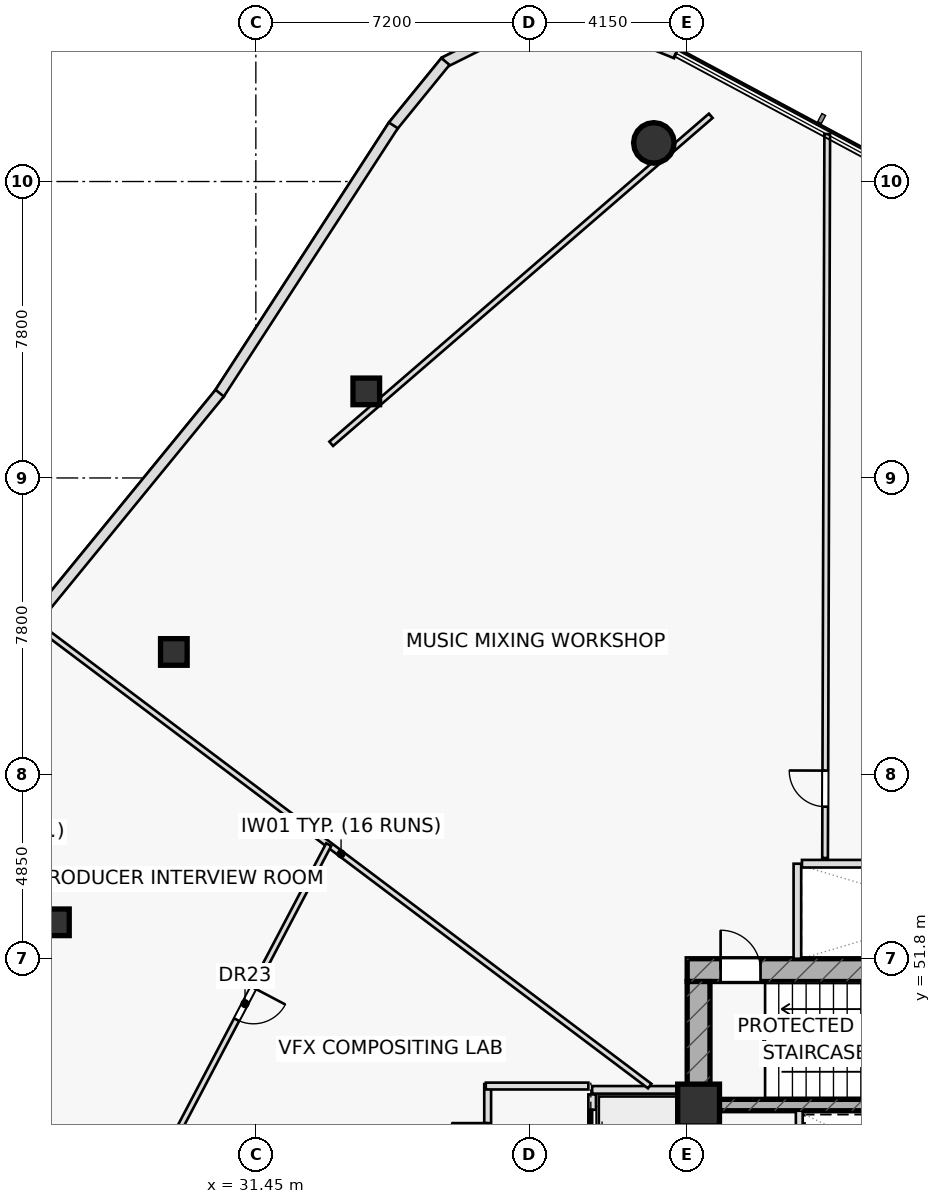
"""IFC4 building model, lengths in metres.
Left out: names, types, materials, properties, quantities, classifications, styles, units other than length and angle.
Written with IfcOpenShell. Run it as: python <this file> out.ifc"""

import sys

from ifc_helpers import new_model, si_unit, direction, frame, frame_2d, origin, origin_2d, place, context, subcontext, project, spatial, rectangle, hollow_rectangle, hollow_circle, extrude, element, fill, save


model = new_model("IFC4")
c1 = context("Model", 3, precision=1e-05, world=origin(), true_north=direction((0.0, 1.0)))
c2 = subcontext(c1, "Body", "Model", "MODEL_VIEW")
j1 = project(units=[si_unit("LENGTHUNIT", "METRE"), si_unit("PLANEANGLEUNIT", "RADIAN")], contexts=[c1])
p1 = place(None, origin())
s1 = spatial("IfcSite", under=j1, at=p1, CompositionType="ELEMENT")
p2 = place(p1, origin())
s2 = spatial("IfcBuilding", under=s1, at=p2, CompositionType="ELEMENT")
p3 = place(p2, frame((0.0, 0.0, 86.1)))
s3 = spatial("IfcBuildingStorey", under=s2, at=p3, CompositionType="ELEMENT", Elevation=86.1)
p4 = place(p3, frame((42.8, 51.5, 0.0), z_axis=(0.0, 0.0, 1.0), x_axis=(1.0, 0.0, 0.0)))
e1 = element("IfcWall", 1, at=p4, inside=s3, PredefinedType="SHEAR", context=c2, shape_type="SweptSolid", body=[
    extrude(rectangle(XDim=14.4, YDim=0.6, at=frame_2d((7.2, 0.0))), origin(), (0.0, 0.0, 1.0), 3.6),
])
p5 = place(p4, frame((0.88, 0.0, 0.0)))
e2 = element("IfcOpeningElement", 2, at=p5, cuts=e1, PredefinedType="OPENING", context=c2, shape_type="SweptSolid", body=[
    extrude(rectangle(XDim=1.05, YDim=2.2, at=frame_2d((0.525, 1.1))), frame((0.0, 0.31, 0.0), z_axis=(0.0, -1.0, 0.0), x_axis=(1.0, 0.0, 0.0)), (0.0, 0.0, 1.0), 0.62),
])
p6 = place(p3, frame((43.1, 38.8, 0.0), z_axis=(0.0, 0.0, 1.0), x_axis=(0.0, 1.0, 0.0)))
e3 = element("IfcWall", 3, at=p6, inside=s3, PredefinedType="SHEAR", context=c2, shape_type="SweptSolid", body=[
    extrude(rectangle(XDim=12.4, YDim=0.6, at=frame_2d((6.2, 0.0))), origin(), (0.0, 0.0, 1.0), 3.6),
])
p7 = place(p3, frame((43.4, 47.95, 0.0), z_axis=(0.0, 0.0, 1.0), x_axis=(1.0, 0.0, 0.0)))
e4 = element("IfcWall", 4, at=p7, inside=s3, PredefinedType="SHEAR", context=c2, shape_type="SweptSolid", body=[
    extrude(rectangle(XDim=13.2, YDim=0.3, at=frame_2d((6.6, 0.0))), origin(), (0.0, 0.0, 1.0), 3.6),
])
p8 = place(p7, frame((8.345, 0.0, 0.0)))
e5 = element("IfcOpeningElement", 5, at=p8, cuts=e4, PredefinedType="OPENING", context=c2, shape_type="SweptSolid", body=[
    extrude(rectangle(XDim=1.15, YDim=2.2, at=frame_2d((0.575, 1.1))), frame((0.0, 0.16, 0.0), z_axis=(0.0, -1.0, 0.0), x_axis=(1.0, 0.0, 0.0)), (0.0, 0.0, 1.0), 0.32),
])
p9 = place(p7, frame((10.065, 0.0, 0.0)))
e6 = element("IfcOpeningElement", 6, at=p9, cuts=e4, PredefinedType="OPENING", context=c2, shape_type="SweptSolid", body=[
    extrude(rectangle(XDim=1.15, YDim=2.2, at=frame_2d((0.575, 1.1))), frame((0.0, 0.16, 0.0), z_axis=(0.0, -1.0, 0.0), x_axis=(1.0, 0.0, 0.0)), (0.0, 0.0, 1.0), 0.32),
])
p10 = place(p7, frame((11.645, 0.0, 0.0)))
e7 = element("IfcOpeningElement", 7, at=p10, cuts=e4, PredefinedType="OPENING", context=c2, shape_type="SweptSolid", body=[
    extrude(rectangle(XDim=1.15, YDim=2.2, at=frame_2d((0.575, 1.1))), frame((0.0, 0.16, 0.0), z_axis=(0.0, -1.0, 0.0), x_axis=(1.0, 0.0, 0.0)), (0.0, 0.0, 1.0), 0.32),
])
p11 = place(p3, frame((43.1, 47.95, 0.0), z_axis=(0.0, 0.0, 1.0), x_axis=(1.0, 0.0, 0.0)))
e8 = element("IfcColumn", 8, at=p11, inside=s3, PredefinedType="COLUMN", context=c2, shape_type="SweptSolid", body=[
    extrude(rectangle(XDim=1.1, YDim=1.1, at=origin_2d()), origin(), (0.0, 0.0, 1.0), 3.6),
])
p12 = place(p3, frame((41.923, 73.266, 0.0), z_axis=(0.0, 0.0, 1.0), x_axis=(1.0, 0.0, 0.0)))
e9 = element("IfcColumn", 9, at=p12, inside=s3, PredefinedType="COLUMN", context=c2, shape_type="SweptSolid", body=[
    extrude(hollow_circle(Radius=0.533, WallThickness=0.045, at=origin_2d()), origin(), (0.0, 0.0, 1.0), 3.6),
])
for number, where, z_axis, x_axis in (
    (10, (34.356, 66.728, 0.0), (0.0, 0.0, 1.0), (1.0, 0.0, 0.0)),
    (11, (29.292, 59.872, 0.0), (0.0, 0.0, 1.0), (1.0, 0.0, 0.0)),
    (12, (26.189, 52.758, 0.0), (0.0, 0.0, 1.0), (1.0, 0.0, 0.0)),
):
    element("IfcColumn", number, at=place(p3, frame(where, z_axis=z_axis, x_axis=x_axis)), inside=s3, PredefinedType="COLUMN", context=c2, shape_type="SweptSolid", body=[
        extrude(hollow_rectangle(XDim=0.7, YDim=0.7, WallThickness=0.04, at=origin_2d()), origin(), (0.0, 0.0, 1.0), 3.6),
    ])
for number, where, z_axis, x_axis in (
    (13, (40.3, 48.35, 0.0), (0.0, 0.0, 1.0), (1.0, 0.0, 0.0)),
    (14, (45.7, 51.8, 0.0), (0.0, 0.0, 1.0), (0.0, 1.0, 0.0)),
):
    element("IfcWall", number, at=place(p3, frame(where, z_axis=z_axis, x_axis=x_axis)), inside=s3, PredefinedType="PARTITIONING", context=c2, shape_type="SweptSolid", body=[
        extrude(rectangle(XDim=2.5, YDim=0.2, at=frame_2d((1.25, 0.0))), origin(), (0.0, 0.0, 1.0), 3.6),
    ])
p13 = place(p3, frame((45.75, 42.2, 0.0), z_axis=(0.0, 0.0, 1.0), x_axis=(0.0, 1.0, 0.0)))
e15 = element("IfcWall", 15, at=p13, inside=s3, PredefinedType="PARTITIONING", context=c2, shape_type="SweptSolid", body=[
    extrude(rectangle(XDim=5.6, YDim=0.18, at=frame_2d((2.8, 0.0))), origin(), (0.0, 0.0, 1.0), 3.6),
])
p14 = place(p13, frame((0.42, 0.0, 0.0)))
e16 = element("IfcOpeningElement", 16, at=p14, cuts=e15, PredefinedType="OPENING", context=c2, shape_type="SweptSolid", body=[
    extrude(rectangle(XDim=0.85, YDim=2.05, at=frame_2d((0.425, 1.025))), frame((0.0, 0.1, 0.0), z_axis=(0.0, -1.0, 0.0), x_axis=(1.0, 0.0, 0.0)), (0.0, 0.0, 1.0), 0.2),
])
p15 = place(p13, frame((1.57, 0.0, 0.0)))
e17 = element("IfcOpeningElement", 17, at=p15, cuts=e15, PredefinedType="OPENING", context=c2, shape_type="SweptSolid", body=[
    extrude(rectangle(XDim=0.85, YDim=2.05, at=frame_2d((0.425, 1.025))), frame((0.0, 0.1, 0.0), z_axis=(0.0, -1.0, 0.0), x_axis=(1.0, 0.0, 0.0)), (0.0, 0.0, 1.0), 0.2),
])
p16 = place(p13, frame((2.8, 0.0, 0.0)))
e18 = element("IfcOpeningElement", 18, at=p16, cuts=e15, PredefinedType="OPENING", context=c2, shape_type="SweptSolid", body=[
    extrude(rectangle(XDim=0.9, YDim=2.05, at=frame_2d((0.45, 1.025))), frame((0.0, 0.1, 0.0), z_axis=(0.0, -1.0, 0.0), x_axis=(1.0, 0.0, 0.0)), (0.0, 0.0, 1.0), 0.2),
])
p17 = place(p3, frame((43.421, 73.979, 0.0), z_axis=(0.0, 0.0, 1.0), x_axis=(-0.756659135409, -0.653809569218, 0.0)))
e19 = element("IfcWall", 19, at=p17, inside=s3, PredefinedType="PARTITIONING", context=c2, shape_type="SweptSolid", body=[
    extrude(rectangle(XDim=13.2, YDim=0.15, at=frame_2d((6.6, 0.0))), origin(), (0.0, 0.0, 1.0), 2.975),
])
p18 = place(p3, frame((46.428, 54.45, 0.0), z_axis=(0.0, 0.0, 1.0), x_axis=(0.002998909978, 0.999995503259, 0.0)))
e20 = element("IfcWall", 20, at=p18, inside=s3, PredefinedType="PARTITIONING", context=c2, shape_type="SweptSolid", body=[
    extrude(rectangle(XDim=19.05, YDim=0.15, at=frame_2d((9.525, 0.0))), origin(), (0.0, 0.0, 1.0), 3.025),
])
p19 = place(p18, frame((1.35, 0.0, 0.0)))
e21 = element("IfcOpeningElement", 21, at=p19, cuts=e20, PredefinedType="OPENING", context=c2, shape_type="SweptSolid", body=[
    extrude(rectangle(XDim=0.95, YDim=2.05, at=frame_2d((0.475, 1.025))), frame((0.0, 0.085, 0.0), z_axis=(0.0, -1.0, 0.0), x_axis=(1.0, 0.0, 0.0)), (0.0, 0.0, 1.0), 0.17),
])
p20 = place(p3, frame((41.814, 48.45, 0.0), z_axis=(0.0, 0.0, 1.0), x_axis=(-0.79913144575, 0.601156329429, 0.0)))
e22 = element("IfcWall", 22, at=p20, inside=s3, PredefinedType="PARTITIONING", context=c2, shape_type="SweptSolid", body=[
    extrude(rectangle(XDim=20.325, YDim=0.15, at=frame_2d((10.163, 0.0))), origin(), (0.0, 0.0, 1.0), 2.975),
])
p21 = place(p3, frame((33.368, 54.804, 0.0), z_axis=(0.0, 0.0, 1.0), x_axis=(-0.465574129331, -0.885008887016, 0.0)))
e23 = element("IfcWall", 23, at=p21, inside=s3, PredefinedType="PARTITIONING", context=c2, shape_type="SweptSolid", body=[
    extrude(rectangle(XDim=9.461, YDim=0.15, at=frame_2d((4.73, 0.0))), origin(), (0.0, 0.0, 1.0), 2.975),
])
p22 = place(p21, frame((4.256, 0.0, 0.0)))
e24 = element("IfcOpeningElement", 24, at=p22, cuts=e23, PredefinedType="OPENING", context=c2, shape_type="SweptSolid", body=[
    extrude(rectangle(XDim=0.95, YDim=2.05, at=frame_2d((0.475, 1.025))), frame((0.0, 0.085, 0.0), z_axis=(0.0, -1.0, 0.0), x_axis=(1.0, 0.0, 0.0)), (0.0, 0.0, 1.0), 0.17),
])
p23 = place(p3, frame((37.55, 35.85, 0.0), z_axis=(0.0, 0.0, 1.0), x_axis=(0.0, 1.0, 0.0)))
e25 = element("IfcWall", 25, at=p23, inside=s3, PredefinedType="PARTITIONING", context=c2, shape_type="SweptSolid", body=[
    extrude(rectangle(XDim=12.65, YDim=0.18, at=frame_2d((6.325, 0.0))), origin(), (0.0, 0.0, 1.0), 2.975),
])
p24 = place(p23, frame((2.088, 0.0, 0.0)))
e26 = element("IfcOpeningElement", 26, at=p24, cuts=e25, PredefinedType="OPENING", context=c2, shape_type="SweptSolid", body=[
    extrude(rectangle(XDim=0.95, YDim=2.05, at=frame_2d((0.475, 1.025))), frame((0.0, 0.1, 0.0), z_axis=(0.0, -1.0, 0.0), x_axis=(1.0, 0.0, 0.0)), (0.0, 0.0, 1.0), 0.2),
])
p25 = place(p23, frame((5.683, 0.0, 0.0)))
e27 = element("IfcOpeningElement", 27, at=p25, cuts=e25, PredefinedType="OPENING", context=c2, shape_type="SweptSolid", body=[
    extrude(rectangle(XDim=0.95, YDim=2.05, at=frame_2d((0.475, 1.025))), frame((0.0, 0.1, 0.0), z_axis=(0.0, -1.0, 0.0), x_axis=(1.0, 0.0, 0.0)), (0.0, 0.0, 1.0), 0.2),
])
p26 = place(p23, frame((8.173, 0.0, 0.0)))
e28 = element("IfcOpeningElement", 28, at=p26, cuts=e25, PredefinedType="OPENING", context=c2, shape_type="SweptSolid", body=[
    extrude(rectangle(XDim=0.95, YDim=2.05, at=frame_2d((0.475, 1.025))), frame((0.0, 0.1, 0.0), z_axis=(0.0, -1.0, 0.0), x_axis=(1.0, 0.0, 0.0)), (0.0, 0.0, 1.0), 0.2),
])
p27 = place(p23, frame((10.675, 0.0, 0.0)))
e29 = element("IfcOpeningElement", 29, at=p27, cuts=e25, PredefinedType="OPENING", context=c2, shape_type="SweptSolid", body=[
    extrude(rectangle(XDim=0.95, YDim=2.05, at=frame_2d((0.475, 1.025))), frame((0.0, 0.1, 0.0), z_axis=(0.0, -1.0, 0.0), x_axis=(1.0, 0.0, 0.0)), (0.0, 0.0, 1.0), 0.2),
])
p28 = place(p3, frame((37.5, 48.45, 0.0), z_axis=(0.0, 0.0, 1.0), x_axis=(1.0, 0.0, 0.0)))
e30 = element("IfcWall", 30, at=p28, inside=s3, PredefinedType="PARTITIONING", context=c2, shape_type="SweptSolid", body=[
    extrude(rectangle(XDim=2.7, YDim=0.18, at=frame_2d((1.35, 0.0))), origin(), (0.0, 0.0, 1.0), 3.6),
])
p29 = place(p3, frame((42.507, 75.624, 0.0), z_axis=(0.0, 0.0, 1.0), x_axis=(-0.926851598558, 0.375427908194, 0.0)))
e31 = element("IfcWall", 31, at=p29, inside=s3, PredefinedType="STANDARD", context=c2, shape_type="SweptSolid", body=[
    extrude(rectangle(XDim=2.188, YDim=0.28, at=frame_2d((1.094, 0.0))), origin(), (0.0, 0.0, 1.0), 3.6),
])
p30 = place(p3, frame((38.363, 76.362, 0.0), z_axis=(0.0, 0.0, 1.0), x_axis=(-0.894516916348, -0.44703409978, 0.0)))
e32 = element("IfcWall", 32, at=p30, inside=s3, PredefinedType="STANDARD", context=c2, shape_type="SweptSolid", body=[
    extrude(rectangle(XDim=2.176, YDim=0.28, at=frame_2d((1.088, 0.0))), origin(), (0.0, 0.0, 1.0), 3.6),
])
p31 = place(p3, frame((36.439, 75.408, 0.0), z_axis=(0.0, 0.0, 1.0), x_axis=(-0.631294698171, -0.775543038175, 0.0)))
e33 = element("IfcWall", 33, at=p31, inside=s3, PredefinedType="STANDARD", context=c2, shape_type="SweptSolid", body=[
    extrude(rectangle(XDim=2.198, YDim=0.28, at=frame_2d((1.099, 0.0))), origin(), (0.0, 0.0, 1.0), 3.6),
])
p32 = place(p3, frame((35.069, 73.727, 0.0), z_axis=(0.0, 0.0, 1.0), x_axis=(-0.544309027103, -0.838884785304, 0.0)))
e34 = element("IfcWall", 34, at=p32, inside=s3, PredefinedType="STANDARD", context=c2, shape_type="SweptSolid", body=[
    extrude(rectangle(XDim=8.428, YDim=0.28, at=frame_2d((4.214, 0.0))), origin(), (0.0, 0.0, 1.0), 3.6),
])
p33 = place(p3, frame((30.499, 66.681, 0.0), z_axis=(0.0, 0.0, 1.0), x_axis=(-0.632922306021, -0.774215315362, 0.0)))
e35 = element("IfcWall", 35, at=p33, inside=s3, PredefinedType="STANDARD", context=c2, shape_type="SweptSolid", body=[
    extrude(rectangle(XDim=9.02, YDim=0.28, at=frame_2d((4.51, 0.0))), origin(), (0.0, 0.0, 1.0), 3.6),
])
p34 = place(p3, frame((40.3, 40.02, 0.0), z_axis=(0.0, 0.0, 1.0), x_axis=(0.0, 1.0, 0.0)))
e36 = element("IfcWall", 36, at=p34, inside=s3, PredefinedType="PARTITIONING", context=c2, shape_type="SweptSolid", body=[
    extrude(rectangle(XDim=8.21, YDim=0.2, at=frame_2d((4.105, 0.0))), origin(), (0.0, 0.0, 1.0), 3.6),
])
p35 = place(p34, frame((0.405, 0.0, 0.0)))
e37 = element("IfcOpeningElement", 37, at=p35, cuts=e36, PredefinedType="OPENING", context=c2, shape_type="SweptSolid", body=[
    extrude(rectangle(XDim=1.1, YDim=2.15, at=frame_2d((0.55, 1.075))), frame((0.0, 0.11, 0.0), z_axis=(0.0, -1.0, 0.0), x_axis=(1.0, 0.0, 0.0)), (0.0, 0.0, 1.0), 0.22),
])
p36 = place(p34, frame((2.505, 0.0, 0.0)))
e38 = element("IfcOpeningElement", 38, at=p36, cuts=e36, PredefinedType="OPENING", context=c2, shape_type="SweptSolid", body=[
    extrude(rectangle(XDim=1.1, YDim=2.15, at=frame_2d((0.55, 1.075))), frame((0.0, 0.11, 0.0), z_axis=(0.0, -1.0, 0.0), x_axis=(1.0, 0.0, 0.0)), (0.0, 0.0, 1.0), 0.22),
])
p37 = place(p34, frame((4.605, 0.0, 0.0)))
e39 = element("IfcOpeningElement", 39, at=p37, cuts=e36, PredefinedType="OPENING", context=c2, shape_type="SweptSolid", body=[
    extrude(rectangle(XDim=1.1, YDim=2.15, at=frame_2d((0.55, 1.075))), frame((0.0, 0.11, 0.0), z_axis=(0.0, -1.0, 0.0), x_axis=(1.0, 0.0, 0.0)), (0.0, 0.0, 1.0), 0.22),
])
p38 = place(p34, frame((6.705, 0.0, 0.0)))
e40 = element("IfcOpeningElement", 40, at=p38, cuts=e36, PredefinedType="OPENING", context=c2, shape_type="SweptSolid", body=[
    extrude(rectangle(XDim=1.1, YDim=2.15, at=frame_2d((0.55, 1.075))), frame((0.0, 0.11, 0.0), z_axis=(0.0, -1.0, 0.0), x_axis=(1.0, 0.0, 0.0)), (0.0, 0.0, 1.0), 0.22),
])
p39 = place(p3, frame((45.82, 54.3, 0.0), z_axis=(0.0, 0.0, 1.0), x_axis=(1.0, 0.0, 0.0)))
e41 = element("IfcWall", 41, at=p39, inside=s3, PredefinedType="PARTITIONING", context=c2, shape_type="SweptSolid", body=[
    extrude(rectangle(XDim=8.31, YDim=0.2, at=frame_2d((4.155, 0.0))), origin(), (0.0, 0.0, 1.0), 3.6),
])
p40 = place(p5, origin())
e42 = element("IfcDoor", 42, at=p40, inside=s3, OperationType="SINGLE_SWING_LEFT", PredefinedType="DOOR", context=c2, shape_type="SweptSolid", body=[
    extrude(rectangle(XDim=1.05, YDim=2.2, at=frame_2d((0.525, 1.1))), frame((0.0, 0.025, 0.0), z_axis=(0.0, -1.0, 0.0), x_axis=(1.0, 0.0, 0.0)), (0.0, 0.0, 1.0), 0.05),
])
fill(e2, e42)
p41 = place(p19, origin())
e43 = element("IfcDoor", 43, at=p41, inside=s3, OperationType="SINGLE_SWING_RIGHT", PredefinedType="DOOR", context=c2, shape_type="SweptSolid", body=[
    extrude(rectangle(XDim=0.95, YDim=2.05, at=frame_2d((0.475, 1.025))), frame((0.0, 0.025, 0.0), z_axis=(0.0, -1.0, 0.0), x_axis=(1.0, 0.0, 0.0)), (0.0, 0.0, 1.0), 0.05),
])
fill(e21, e43)
p42 = place(p22, origin())
e44 = element("IfcDoor", 44, at=p42, inside=s3, OperationType="SINGLE_SWING_LEFT", PredefinedType="DOOR", context=c2, shape_type="SweptSolid", body=[
    extrude(rectangle(XDim=0.95, YDim=2.05, at=frame_2d((0.475, 1.025))), frame((0.0, 0.025, 0.0), z_axis=(0.0, -1.0, 0.0), x_axis=(1.0, 0.0, 0.0)), (0.0, 0.0, 1.0), 0.05),
])
fill(e24, e44)
p43 = place(p27, origin())
e45 = element("IfcDoor", 45, at=p43, inside=s3, OperationType="SINGLE_SWING_RIGHT", PredefinedType="DOOR", context=c2, shape_type="SweptSolid", body=[
    extrude(rectangle(XDim=0.95, YDim=2.05, at=frame_2d((0.475, 1.025))), frame((0.0, 0.025, 0.0), z_axis=(0.0, -1.0, 0.0), x_axis=(1.0, 0.0, 0.0)), (0.0, 0.0, 1.0), 0.05),
])
fill(e29, e45)
p44 = place(p38, origin())
e46 = element("IfcDoor", 46, at=p44, inside=s3, OperationType="SLIDING_TO_RIGHT", PredefinedType="DOOR", context=c2, shape_type="SweptSolid", body=[
    extrude(rectangle(XDim=1.1, YDim=2.15, at=frame_2d((0.55, 1.075))), frame((0.0, 0.025, 0.0), z_axis=(0.0, -1.0, 0.0), x_axis=(1.0, 0.0, 0.0)), (0.0, 0.0, 1.0), 0.05),
])
fill(e40, e46)
save(model, sys.argv[1])
